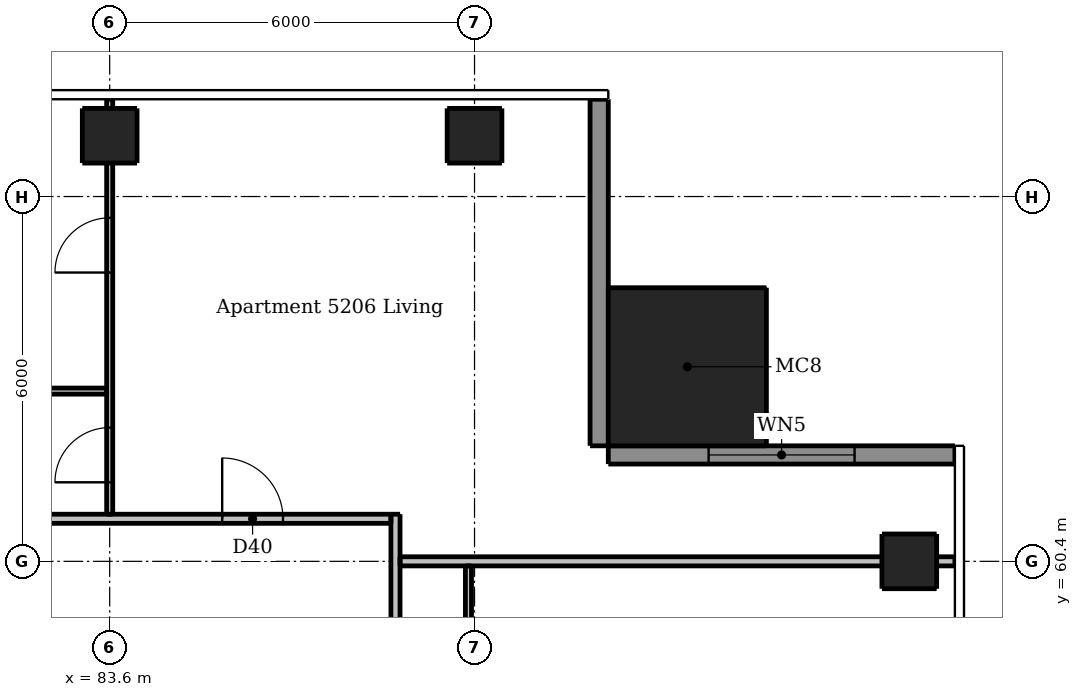
"""IFC4 building model, lengths in metres.
Left out: names, types, materials, properties, quantities, classifications, styles, units other than length and angle.
Written with IfcOpenShell. Run it as: python <this file> out.ifc"""

import sys

from ifc_helpers import new_model, si_unit, direction, frame, frame_2d, origin, origin_2d, place, context, subcontext, project, spatial, rectangle, extrude, element, fill, save


model = new_model("IFC4")
c1 = context("Model", 3, precision=1e-05, world=origin(), true_north=direction((0.0, 1.0)))
c2 = subcontext(c1, "Body", "Model", "MODEL_VIEW")
j1 = project(units=[si_unit("LENGTHUNIT", "METRE"), si_unit("PLANEANGLEUNIT", "RADIAN")], contexts=[c1])
p1 = place(None, origin())
s1 = spatial("IfcSite", under=j1, at=p1, CompositionType="ELEMENT")
p2 = place(p1, origin())
s2 = spatial("IfcBuilding", under=s1, at=p2, CompositionType="ELEMENT")
p3 = place(p2, frame((0.0, 0.0, 196.9)))
s3 = spatial("IfcBuildingStorey", under=s2, at=p3, CompositionType="ELEMENT", Elevation=196.9)
for number, where, z_axis, x_axis in (
    (1, (96.75, 60.4, 0.0), (0.0, 0.0, 1.0), (1.0, 0.0, 0.0)),
    (2, (83.6, 67.4, 0.0), (0.0, 0.0, 1.0), (1.0, 0.0, 0.0)),
    (3, (89.6, 67.4, 0.0), (0.0, 0.0, 1.0), (1.0, 0.0, 0.0)),
):
    element("IfcColumn", number, at=place(p3, frame(where, z_axis=z_axis, x_axis=x_axis)), inside=s3, PredefinedType="COLUMN", context=c2, shape_type="SweptSolid", body=[
        extrude(rectangle(XDim=0.9, YDim=0.9, at=origin_2d()), origin(), (0.0, 0.0, 1.0), 3.05),
    ])
p4 = place(p3, frame((93.1, 63.6, 0.0), z_axis=(0.0, 0.0, 1.0), x_axis=(1.0, 0.0, 0.0)))
e4 = element("IfcColumn", 4, at=p4, inside=s3, PredefinedType="COLUMN", context=c2, shape_type="SweptSolid", body=[
    extrude(rectangle(XDim=2.6, YDim=2.6, at=origin_2d()), origin(), (0.0, 0.0, 1.0), 3.3),
])
p5 = place(p3, frame((97.5, 62.15, 0.0), z_axis=(0.0, 0.0, 1.0), x_axis=(-1.0, 0.0, 0.0)))
e5 = element("IfcWall", 5, at=p5, inside=s3, PredefinedType="SOLIDWALL", context=c2, shape_type="SweptSolid", body=[
    extrude(rectangle(XDim=5.7, YDim=0.3, at=frame_2d((2.85, 0.0))), origin(), (0.0, 0.0, 1.0), 3.05),
])
p6 = place(p5, frame((1.65, 0.0, 0.15)))
e6 = element("IfcOpeningElement", 6, at=p6, cuts=e5, PredefinedType="OPENING", context=c2, shape_type="SweptSolid", body=[
    extrude(rectangle(XDim=2.4, YDim=2.1, at=frame_2d((1.2, 1.05))), frame((0.0, 0.16, 0.0), z_axis=(0.0, -1.0, 0.0), x_axis=(1.0, 0.0, 0.0)), (0.0, 0.0, 1.0), 0.32),
])
p7 = place(p3, frame((91.65, 62.3, 0.0), z_axis=(0.0, 0.0, 1.0), x_axis=(0.0, 1.0, 0.0)))
e7 = element("IfcWall", 7, at=p7, inside=s3, PredefinedType="SOLIDWALL", context=c2, shape_type="SweptSolid", body=[
    extrude(rectangle(XDim=5.7, YDim=0.3, at=frame_2d((2.85, 0.0))), origin(), (0.0, 0.0, 1.0), 3.05),
])
p8 = place(p3, frame((83.6, 61.175, 0.0), z_axis=(0.0, 0.0, 1.0), x_axis=(0.0, 1.0, 0.0)))
e8 = element("IfcWall", 8, at=p8, inside=s3, PredefinedType="PARTITIONING", context=c2, shape_type="SweptSolid", body=[
    extrude(rectangle(XDim=6.825, YDim=0.1, at=frame_2d((3.413, 0.0))), origin(), (0.0, 0.0, 1.0), 2.516),
])
p9 = place(p8, frame((0.525, 0.0, 0.0)))
e9 = element("IfcOpeningElement", 9, at=p9, cuts=e8, PredefinedType="OPENING", context=c2, shape_type="SweptSolid", body=[
    extrude(rectangle(XDim=0.9, YDim=2.1, at=frame_2d((0.45, 1.05))), frame((0.0, 0.06, 0.0), z_axis=(0.0, -1.0, 0.0), x_axis=(1.0, 0.0, 0.0)), (0.0, 0.0, 1.0), 0.12),
])
p10 = place(p8, frame((3.975, 0.0, 0.0)))
e10 = element("IfcOpeningElement", 10, at=p10, cuts=e8, PredefinedType="OPENING", context=c2, shape_type="SweptSolid", body=[
    extrude(rectangle(XDim=0.9, YDim=2.1, at=frame_2d((0.45, 1.05))), frame((0.0, 0.06, 0.0), z_axis=(0.0, -1.0, 0.0), x_axis=(1.0, 0.0, 0.0)), (0.0, 0.0, 1.0), 0.12),
])
p11 = place(p3, frame((89.5, 60.325, 0.0), z_axis=(0.0, 0.0, 1.0), x_axis=(0.0, -1.0, 0.0)))
e11 = element("IfcWall", 11, at=p11, inside=s3, PredefinedType="PARTITIONING", context=c2, shape_type="SweptSolid", body=[
    extrude(rectangle(XDim=20.85, YDim=0.1, at=frame_2d((10.425, 0.0))), origin(), (0.0, 0.0, 1.0), 2.51),
])
p12 = place(p11, frame((10.575, 0.0, 0.0)))
e12 = element("IfcOpeningElement", 12, at=p12, cuts=e11, PredefinedType="OPENING", context=c2, shape_type="SweptSolid", body=[
    extrude(rectangle(XDim=0.9, YDim=2.1, at=frame_2d((0.45, 1.05))), frame((0.0, 0.06, 0.0), z_axis=(0.0, -1.0, 0.0), x_axis=(1.0, 0.0, 0.0)), (0.0, 0.0, 1.0), 0.12),
])
p13 = place(p11, frame((6.675, 0.0, 0.0)))
e13 = element("IfcOpeningElement", 13, at=p13, cuts=e11, PredefinedType="OPENING", context=c2, shape_type="SweptSolid", body=[
    extrude(rectangle(XDim=0.9, YDim=2.1, at=frame_2d((0.45, 1.05))), frame((0.0, 0.06, 0.0), z_axis=(0.0, -1.0, 0.0), x_axis=(1.0, 0.0, 0.0)), (0.0, 0.0, 1.0), 0.12),
])
p14 = place(p11, frame((8.775, 0.0, 0.0)))
e14 = element("IfcOpeningElement", 14, at=p14, cuts=e11, PredefinedType="OPENING", context=c2, shape_type="SweptSolid", body=[
    extrude(rectangle(XDim=0.9, YDim=2.1, at=frame_2d((0.45, 1.05))), frame((0.0, 0.06, 0.0), z_axis=(0.0, -1.0, 0.0), x_axis=(1.0, 0.0, 0.0)), (0.0, 0.0, 1.0), 0.12),
])
p15 = place(p11, frame((19.075, 0.0, 0.0)))
e15 = element("IfcOpeningElement", 15, at=p15, cuts=e11, PredefinedType="OPENING", context=c2, shape_type="SweptSolid", body=[
    extrude(rectangle(XDim=0.9, YDim=2.1, at=frame_2d((0.45, 1.05))), frame((0.0, 0.06, 0.0), z_axis=(0.0, -1.0, 0.0), x_axis=(1.0, 0.0, 0.0)), (0.0, 0.0, 1.0), 0.12),
])
p16 = place(p11, frame((15.775, 0.0, 0.0)))
e16 = element("IfcOpeningElement", 16, at=p16, cuts=e11, PredefinedType="OPENING", context=c2, shape_type="SweptSolid", body=[
    extrude(rectangle(XDim=0.9, YDim=2.1, at=frame_2d((0.45, 1.05))), frame((0.0, 0.06, 0.0), z_axis=(0.0, -1.0, 0.0), x_axis=(1.0, 0.0, 0.0)), (0.0, 0.0, 1.0), 0.12),
])
p17 = place(p11, frame((1.275, 0.0, 0.0)))
e17 = element("IfcOpeningElement", 17, at=p17, cuts=e11, PredefinedType="OPENING", context=c2, shape_type="SweptSolid", body=[
    extrude(rectangle(XDim=0.9, YDim=2.1, at=frame_2d((0.45, 1.05))), frame((0.0, 0.06, 0.0), z_axis=(0.0, -1.0, 0.0), x_axis=(1.0, 0.0, 0.0)), (0.0, 0.0, 1.0), 0.12),
])
p18 = place(p11, frame((12.725, 0.0, 0.0)))
e18 = element("IfcOpeningElement", 18, at=p18, cuts=e11, PredefinedType="OPENING", context=c2, shape_type="SweptSolid", body=[
    extrude(rectangle(XDim=0.8, YDim=2.1, at=frame_2d((0.4, 1.05))), frame((0.0, 0.06, 0.0), z_axis=(0.0, -1.0, 0.0), x_axis=(1.0, 0.0, 0.0)), (0.0, 0.0, 1.0), 0.12),
])
p19 = place(p11, frame((4.325, 0.0, 0.0)))
e19 = element("IfcOpeningElement", 19, at=p19, cuts=e11, PredefinedType="OPENING", context=c2, shape_type="SweptSolid", body=[
    extrude(rectangle(XDim=0.8, YDim=2.1, at=frame_2d((0.4, 1.05))), frame((0.0, 0.06, 0.0), z_axis=(0.0, -1.0, 0.0), x_axis=(1.0, 0.0, 0.0)), (0.0, 0.0, 1.0), 0.12),
])
p20 = place(p3, frame((83.55, 63.2, 0.0), z_axis=(0.0, 0.0, 1.0), x_axis=(-1.0, 0.0, 0.0)))
e20 = element("IfcWall", 20, at=p20, inside=s3, PredefinedType="PARTITIONING", context=c2, shape_type="SweptSolid", body=[
    extrude(rectangle(XDim=5.875, YDim=0.1, at=frame_2d((2.938, 0.0))), origin(), (0.0, 0.0, 1.0), 3.05),
])
p21 = place(p20, frame((3.75, 0.0, 0.0)))
e21 = element("IfcOpeningElement", 21, at=p21, cuts=e20, PredefinedType="OPENING", context=c2, shape_type="SweptSolid", body=[
    extrude(rectangle(XDim=0.8, YDim=2.1, at=frame_2d((0.4, 1.05))), frame((0.0, 0.06, 0.0), z_axis=(0.0, -1.0, 0.0), x_axis=(1.0, 0.0, 0.0)), (0.0, 0.0, 1.0), 0.12),
])
p22 = place(p3, frame((88.3, 61.175, 0.0), z_axis=(0.0, 0.0, 1.0), x_axis=(0.0, -1.0, 0.0)))
e22 = element("IfcWall", 22, at=p22, inside=s3, PredefinedType="PARTITIONING", context=c2, shape_type="SweptSolid", body=[
    extrude(rectangle(XDim=29.4, YDim=0.15, at=frame_2d((14.7, 0.0))), origin(), (0.0, 0.0, 1.0), 3.05),
])
p23 = place(p22, frame((28.125, 0.0, 0.0)))
e23 = element("IfcOpeningElement", 23, at=p23, cuts=e22, PredefinedType="OPENING", context=c2, shape_type="SweptSolid", body=[
    extrude(rectangle(XDim=1.0, YDim=2.1, at=frame_2d((0.5, 1.05))), frame((0.0, 0.085, 0.0), z_axis=(0.0, -1.0, 0.0), x_axis=(1.0, 0.0, 0.0)), (0.0, 0.0, 1.0), 0.17),
])
p24 = place(p22, frame((10.775, 0.0, 0.0)))
e24 = element("IfcOpeningElement", 24, at=p24, cuts=e22, PredefinedType="OPENING", context=c2, shape_type="SweptSolid", body=[
    extrude(rectangle(XDim=1.0, YDim=2.1, at=frame_2d((0.5, 1.05))), frame((0.0, 0.085, 0.0), z_axis=(0.0, -1.0, 0.0), x_axis=(1.0, 0.0, 0.0)), (0.0, 0.0, 1.0), 0.17),
])
p25 = place(p3, frame((58.975, 61.1, 0.0), z_axis=(0.0, 0.0, 1.0), x_axis=(1.0, 0.0, 0.0)))
e25 = element("IfcWall", 25, at=p25, inside=s3, PredefinedType="PARTITIONING", context=c2, shape_type="SweptSolid", body=[
    extrude(rectangle(XDim=29.25, YDim=0.15, at=frame_2d((14.625, 0.0))), origin(), (0.0, 0.0, 1.0), 3.05),
])
p26 = place(p25, frame((7.925, 0.0, 0.0)))
e26 = element("IfcOpeningElement", 26, at=p26, cuts=e25, PredefinedType="OPENING", context=c2, shape_type="SweptSolid", body=[
    extrude(rectangle(XDim=1.0, YDim=2.1, at=frame_2d((0.5, 1.05))), frame((0.0, 0.085, 0.0), z_axis=(0.0, -1.0, 0.0), x_axis=(1.0, 0.0, 0.0)), (0.0, 0.0, 1.0), 0.17),
])
p27 = place(p25, frame((26.475, 0.0, 0.0)))
e27 = element("IfcOpeningElement", 27, at=p27, cuts=e25, PredefinedType="OPENING", context=c2, shape_type="SweptSolid", body=[
    extrude(rectangle(XDim=1.0, YDim=2.1, at=frame_2d((0.5, 1.05))), frame((0.0, 0.085, 0.0), z_axis=(0.0, -1.0, 0.0), x_axis=(1.0, 0.0, 0.0)), (0.0, 0.0, 1.0), 0.17),
])
p28 = place(p3, frame((88.375, 60.4, 0.0), z_axis=(0.0, 0.0, 1.0), x_axis=(1.0, 0.0, 0.0)))
e28 = element("IfcWall", 28, at=p28, inside=s3, PredefinedType="PARTITIONING", context=c2, shape_type="SweptSolid", body=[
    extrude(rectangle(XDim=9.125, YDim=0.15, at=frame_2d((4.562, 0.0))), origin(), (0.0, 0.0, 1.0), 2.59),
])
p29 = place(p6, origin())
e29 = element("IfcWindow", 29, at=p29, inside=s3, PartitioningType="DOUBLE_PANEL_VERTICAL", PredefinedType="WINDOW", context=c2, shape_type="SweptSolid", body=[
    extrude(rectangle(XDim=2.4, YDim=2.1, at=frame_2d((1.2, 1.05))), frame((0.0, 0.03, 0.0), z_axis=(0.0, -1.0, 0.0), x_axis=(1.0, 0.0, 0.0)), (0.0, 0.0, 1.0), 0.06),
])
fill(e6, e29)
p30 = place(p27, origin())
e30 = element("IfcDoor", 30, at=p30, inside=s3, OperationType="SINGLE_SWING_LEFT", PredefinedType="DOOR", context=c2, shape_type="SweptSolid", body=[
    extrude(rectangle(XDim=1.0, YDim=2.1, at=frame_2d((0.5, 1.05))), frame((0.0, 0.025, 0.0), z_axis=(0.0, -1.0, 0.0), x_axis=(1.0, 0.0, 0.0)), (0.0, 0.0, 1.0), 0.05),
])
fill(e27, e30)
p31 = place(p9, origin())
e31 = element("IfcDoor", 31, at=p31, inside=s3, OperationType="SINGLE_SWING_LEFT", PredefinedType="DOOR", context=c2, shape_type="SweptSolid", body=[
    extrude(rectangle(XDim=0.9, YDim=2.1, at=frame_2d((0.45, 1.05))), frame((0.0, 0.025, 0.0), z_axis=(0.0, -1.0, 0.0), x_axis=(1.0, 0.0, 0.0)), (0.0, 0.0, 1.0), 0.05),
])
fill(e9, e31)
p32 = place(p10, origin())
e32 = element("IfcDoor", 32, at=p32, inside=s3, OperationType="SINGLE_SWING_LEFT", PredefinedType="DOOR", context=c2, shape_type="SweptSolid", body=[
    extrude(rectangle(XDim=0.9, YDim=2.1, at=frame_2d((0.45, 1.05))), frame((0.0, 0.025, 0.0), z_axis=(0.0, -1.0, 0.0), x_axis=(1.0, 0.0, 0.0)), (0.0, 0.0, 1.0), 0.05),
])
fill(e10, e32)
save(model, sys.argv[1])
